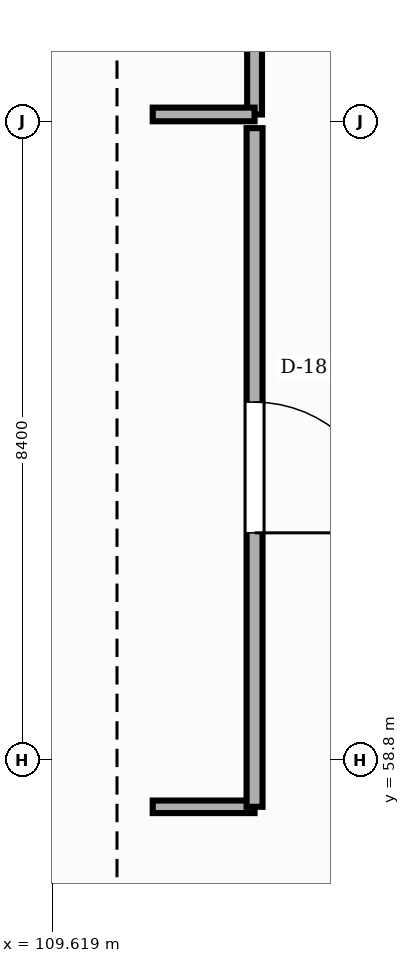
"""IFC4 building model, lengths in metres.
Left out: names, types, materials, properties, quantities, classifications, styles, units other than length and angle.
Written with IfcOpenShell. Run it as: python <this file> out.ifc"""

import sys

from ifc_helpers import new_model, si_unit, direction, frame, frame_2d, origin, place, context, subcontext, project, spatial, rectangle, extrude, element, fill, save


model = new_model("IFC4")
c1 = context("Model", 3, precision=1e-05, world=origin(), true_north=direction((0.0, 1.0)))
c2 = subcontext(c1, "Body", "Model", "MODEL_VIEW")
j1 = project(units=[si_unit("LENGTHUNIT", "METRE"), si_unit("PLANEANGLEUNIT", "RADIAN")], contexts=[c1])
p1 = place(None, origin())
s1 = spatial("IfcSite", under=j1, at=p1, CompositionType="ELEMENT")
p2 = place(p1, origin())
s2 = spatial("IfcBuilding", under=s1, at=p2, CompositionType="ELEMENT")
p3 = place(p2, frame((0.0, 0.0, 13.95)))
s3 = spatial("IfcBuildingStorey", under=s2, at=p3, CompositionType="ELEMENT", Elevation=13.95)
p4 = place(p3, frame((112.28, 83.91, -0.004), z_axis=(0.0, 0.0, 1.0), x_axis=(0.0, -1.0, 0.0)))
e1 = element("IfcWall", 1, at=p4, inside=s3, PredefinedType="STANDARD", context=c2, shape_type="SweptSolid", body=[
    extrude(rectangle(XDim=16.62, YDim=0.195, at=frame_2d((8.31, 0.0))), origin(), (0.0, 0.0, 1.0), 3.611),
])
p5 = place(p4, frame((3.385, 0.0, 0.0)))
e2 = element("IfcOpeningElement", 2, at=p5, cuts=e1, PredefinedType="OPENING", context=c2, shape_type="SweptSolid", body=[
    extrude(rectangle(XDim=1.54, YDim=2.06, at=frame_2d((0.77, 1.03))), frame((0.0, 0.107, 0.0), z_axis=(0.0, -1.0, 0.0), x_axis=(1.0, 0.0, 0.0)), (0.0, 0.0, 1.0), 0.215),
])
p6 = place(p3, frame((112.28, 67.29, -0.004), z_axis=(0.0, 0.0, 1.0), x_axis=(-1.0, 0.0, 0.0)))
e3 = element("IfcWall", 3, at=p6, inside=s3, PredefinedType="STANDARD", context=c2, shape_type="SweptSolid", body=[
    extrude(rectangle(XDim=1.34, YDim=0.18, at=frame_2d((0.67, 0.0))), origin(), (0.0, 0.0, 1.0), 2.836),
])
p7 = place(p3, frame((112.28, 58.18, -0.004), z_axis=(0.0, 0.0, 1.0), x_axis=(-1.0, 0.0, 0.0)))
e4 = element("IfcWall", 4, at=p7, inside=s3, PredefinedType="STANDARD", context=c2, shape_type="SweptSolid", body=[
    extrude(rectangle(XDim=1.34, YDim=0.165, at=frame_2d((0.67, 0.0))), origin(), (0.0, 0.0, 1.0), 3.854),
])
p8 = place(p3, frame((112.28, 67.11, -0.004), z_axis=(0.0, 0.0, 1.0), x_axis=(0.0, -1.0, 0.0)))
e5 = element("IfcWall", 5, at=p8, inside=s3, PredefinedType="STANDARD", context=c2, shape_type="SweptSolid", body=[
    extrude(rectangle(XDim=8.93, YDim=0.21, at=frame_2d((4.465, 0.0))), origin(), (0.0, 0.0, 1.0), 3.566),
])
p9 = place(p8, frame((3.605, 0.0, 0.0)))
e6 = element("IfcOpeningElement", 6, at=p9, cuts=e5, PredefinedType="OPENING", context=c2, shape_type="SweptSolid", body=[
    extrude(rectangle(XDim=1.72, YDim=2.14, at=frame_2d((0.86, 1.07))), frame((0.0, 0.115, 0.0), z_axis=(0.0, -1.0, 0.0), x_axis=(1.0, 0.0, 0.0)), (0.0, 0.0, 1.0), 0.23),
])
p10 = place(p9, origin())
e7 = element("IfcDoor", 7, at=p10, inside=s3, OperationType="SINGLE_SWING_RIGHT", PredefinedType="DOOR", context=c2, shape_type="SweptSolid", body=[
    extrude(rectangle(XDim=1.72, YDim=2.14, at=frame_2d((0.86, 1.07))), frame((0.0, 0.025, 0.0), z_axis=(0.0, -1.0, 0.0), x_axis=(1.0, 0.0, 0.0)), (0.0, 0.0, 1.0), 0.05),
])
fill(e6, e7)
save(model, sys.argv[1])
